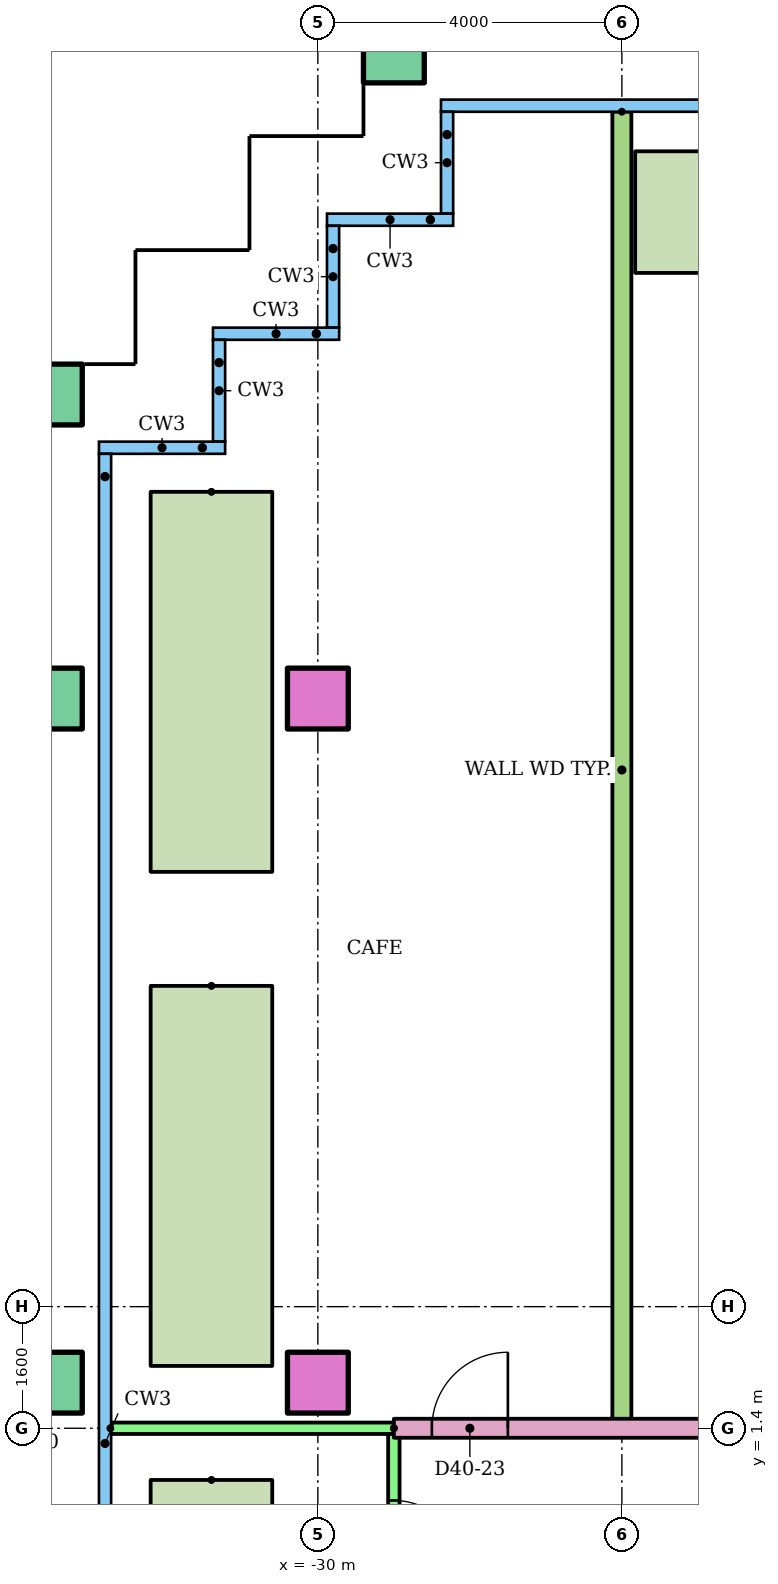
"""IFC4 building model, lengths in metres.
Left out: names, types, materials, properties, quantities, classifications, styles, units other than length and angle.
Written with IfcOpenShell. Run it as: python <this file> out.ifc"""

import sys

from ifc_helpers import new_model, si_unit, direction, frame, frame_2d, origin, origin_2d, place, context, subcontext, project, spatial, rectangle, hollow_rectangle, extrude, element, fill, save


model = new_model("IFC4")
c1 = context("Model", 3, precision=1e-05, world=origin(), true_north=direction((0.0, 1.0)))
c2 = subcontext(c1, "Body", "Model", "MODEL_VIEW")
j1 = project(units=[si_unit("LENGTHUNIT", "METRE"), si_unit("PLANEANGLEUNIT", "RADIAN")], contexts=[c1])
p1 = place(None, origin())
s1 = spatial("IfcSite", under=j1, at=p1, CompositionType="ELEMENT")
p2 = place(p1, origin())
s2 = spatial("IfcBuilding", under=s1, at=p2, CompositionType="ELEMENT")
p3 = place(p2, frame((0.0, 0.0, 151.8)))
s3 = spatial("IfcBuildingStorey", under=s2, at=p3, CompositionType="ELEMENT", Elevation=151.8)
p4 = place(p3, frame((-33.5, 2.0, 0.0)))
e1 = element("IfcColumn", 1, at=p4, inside=s3, PredefinedType="COLUMN", context=c2, shape_type="SweptSolid", body=[
    extrude(hollow_rectangle(XDim=0.8, YDim=0.8, WallThickness=0.04, at=origin_2d()), origin(), (0.0, 0.0, 1.0), 9.25),
])
p5 = place(p3, frame((-30.0, 2.0, 0.0)))
e2 = element("IfcColumn", 2, at=p5, inside=s3, PredefinedType="COLUMN", context=c2, shape_type="SweptSolid", body=[
    extrude(rectangle(XDim=0.8, YDim=0.8, at=origin_2d()), origin(), (0.0, 0.0, 1.0), 8.8),
])
p6 = place(p3, frame((-33.5, 11.0, 0.0)))
e3 = element("IfcColumn", 3, at=p6, inside=s3, PredefinedType="COLUMN", context=c2, shape_type="SweptSolid", body=[
    extrude(hollow_rectangle(XDim=0.8, YDim=0.8, WallThickness=0.04, at=origin_2d()), origin(), (0.0, 0.0, 1.0), 9.25),
])
p7 = place(p3, frame((-30.0, 11.0, 0.0)))
e4 = element("IfcColumn", 4, at=p7, inside=s3, PredefinedType="COLUMN", context=c2, shape_type="SweptSolid", body=[
    extrude(rectangle(XDim=0.8, YDim=0.8, at=origin_2d()), origin(), (0.0, 0.0, 1.0), 8.8),
])
p8 = place(p3, frame((-33.5, 15.0, 0.0)))
e5 = element("IfcColumn", 5, at=p8, inside=s3, PredefinedType="COLUMN", context=c2, shape_type="SweptSolid", body=[
    extrude(hollow_rectangle(XDim=0.8, YDim=0.8, WallThickness=0.04, at=origin_2d()), origin(), (0.0, 0.0, 1.0), 9.25),
])
p9 = place(p3, frame((-29.0, 19.5, 0.0)))
e6 = element("IfcColumn", 6, at=p9, inside=s3, PredefinedType="COLUMN", context=c2, shape_type="SweptSolid", body=[
    extrude(hollow_rectangle(XDim=0.8, YDim=0.8, WallThickness=0.04, at=origin_2d()), origin(), (0.0, 0.0, 1.0), 8.8),
])
for number, where, z_axis, x_axis in (
    (7, (-31.4, 13.72, 0.0), (0.0, 0.0, 1.0), (0.0, -1.0, 0.0)),
    (8, (-31.4, 7.22, 0.0), (0.0, 0.0, 1.0), (0.0, -1.0, 0.0)),
):
    element("IfcWall", number, at=place(p3, frame(where, z_axis=z_axis, x_axis=x_axis)), inside=s3, PredefinedType="STANDARD", context=c2, shape_type="SweptSolid", body=[
        extrude(rectangle(XDim=5.0, YDim=1.6, at=frame_2d((2.5, 0.0))), origin(), (0.0, 0.0, 1.0), 0.8),
    ])
p10 = place(p3, frame((-29.0, 1.4, 0.0), z_axis=(0.0, 0.0, 1.0), x_axis=(0.0, -1.0, 0.0)))
e9 = element("IfcWall", 9, at=p10, inside=s3, PredefinedType="PARTITIONING", context=c2, shape_type="SweptSolid", body=[
    extrude(rectangle(XDim=2.8, YDim=0.15, at=frame_2d((1.4, 0.0))), origin(), (0.0, 0.0, 1.0), 8.8),
])
p11 = place(p10, frame((0.95, 0.0, 0.0)))
e10 = element("IfcOpeningElement", 10, at=p11, cuts=e9, PredefinedType="OPENING", context=c2, shape_type="SweptSolid", body=[
    extrude(rectangle(XDim=0.9, YDim=2.1, at=frame_2d((0.45, 1.05))), frame((0.0, 0.085, 0.0), z_axis=(0.0, -1.0, 0.0), x_axis=(1.0, 0.0, 0.0)), (0.0, 0.0, 1.0), 0.17),
])
p12 = place(p3, frame((-29.0, 1.4, 0.0)))
e11 = element("IfcWall", 11, at=p12, inside=s3, PredefinedType="PARTITIONING", context=c2, shape_type="SweptSolid", body=[
    extrude(rectangle(XDim=15.0, YDim=0.25, at=frame_2d((7.5, 0.0))), origin(), (0.0, 0.0, 1.0), 8.8),
])
p13 = place(p12, frame((12.5, 0.0, 0.0)))
e12 = element("IfcOpeningElement", 12, at=p13, cuts=e11, PredefinedType="OPENING", context=c2, shape_type="SweptSolid", body=[
    extrude(rectangle(XDim=1.0, YDim=2.1, at=frame_2d((0.5, 1.05))), frame((0.0, 0.135, 0.0), z_axis=(0.0, -1.0, 0.0), x_axis=(1.0, 0.0, 0.0)), (0.0, 0.0, 1.0), 0.27),
])
p14 = place(p12, frame((0.5, 0.0, 0.0)))
e13 = element("IfcOpeningElement", 13, at=p14, cuts=e11, PredefinedType="OPENING", context=c2, shape_type="SweptSolid", body=[
    extrude(rectangle(XDim=1.0, YDim=2.1, at=frame_2d((0.5, 1.05))), frame((0.0, 0.135, 0.0), z_axis=(0.0, -1.0, 0.0), x_axis=(1.0, 0.0, 0.0)), (0.0, 0.0, 1.0), 0.27),
])
p15 = place(p3, frame((-32.73, 1.4, 0.0)))
e14 = element("IfcWall", 14, at=p15, inside=s3, PredefinedType="PARTITIONING", context=c2, shape_type="SweptSolid", body=[
    extrude(rectangle(XDim=3.73, YDim=0.15, at=frame_2d((1.865, 0.0))), origin(), (0.0, 0.0, 1.0), 8.8),
])
p16 = place(p3, frame((-26.0, 18.721, 0.0), z_axis=(0.0, 0.0, 1.0), x_axis=(0.0, -1.0, 0.0)))
e15 = element("IfcWall", 15, at=p16, inside=s3, PredefinedType="PARTITIONING", context=c2, shape_type="SweptSolid", body=[
    extrude(rectangle(XDim=17.321, YDim=0.25, at=frame_2d((8.661, 0.0))), origin(), (0.0, 0.0, 1.0), 8.8),
])
p17 = place(p3, frame((-21.6, 17.4, 0.0), z_axis=(0.0, 0.0, 1.0), x_axis=(-1.0, 0.0, 0.0)))
e16 = element("IfcWall", 16, at=p17, inside=s3, PredefinedType="STANDARD", context=c2, shape_type="SweptSolid", body=[
    extrude(rectangle(XDim=4.225, YDim=1.6, at=frame_2d((2.112, 0.0))), origin(), (0.0, 0.0, 1.0), 0.8),
])
p18 = place(p3, frame((-31.4, 0.72, 0.0), z_axis=(0.0, 0.0, 1.0), x_axis=(0.0, -1.0, 0.0)))
e17 = element("IfcWall", 17, at=p18, inside=s3, PredefinedType="STANDARD", context=c2, shape_type="SweptSolid", body=[
    extrude(rectangle(XDim=1.995, YDim=1.6, at=frame_2d((0.998, 0.0))), origin(), (0.0, 0.0, 1.0), 0.8),
])
p19 = place(p11, origin())
e18 = element("IfcDoor", 18, at=p19, inside=s3, OperationType="SINGLE_SWING_RIGHT", PredefinedType="DOOR", context=c2, shape_type="SweptSolid", body=[
    extrude(rectangle(XDim=0.9, YDim=2.1, at=frame_2d((0.45, 1.05))), frame((0.0, 0.025, 0.0), z_axis=(0.0, -1.0, 0.0), x_axis=(1.0, 0.0, 0.0)), (0.0, 0.0, 1.0), 0.05),
])
fill(e10, e18)
p20 = place(p14, origin())
e19 = element("IfcDoor", 19, at=p20, inside=s3, OperationType="SINGLE_SWING_RIGHT", PredefinedType="DOOR", context=c2, shape_type="SweptSolid", body=[
    extrude(rectangle(XDim=1.0, YDim=2.1, at=frame_2d((0.5, 1.05))), frame((0.0, 0.025, 0.0), z_axis=(0.0, -1.0, 0.0), x_axis=(1.0, 0.0, 0.0)), (0.0, 0.0, 1.0), 0.05),
])
fill(e13, e19)
save(model, sys.argv[1])
